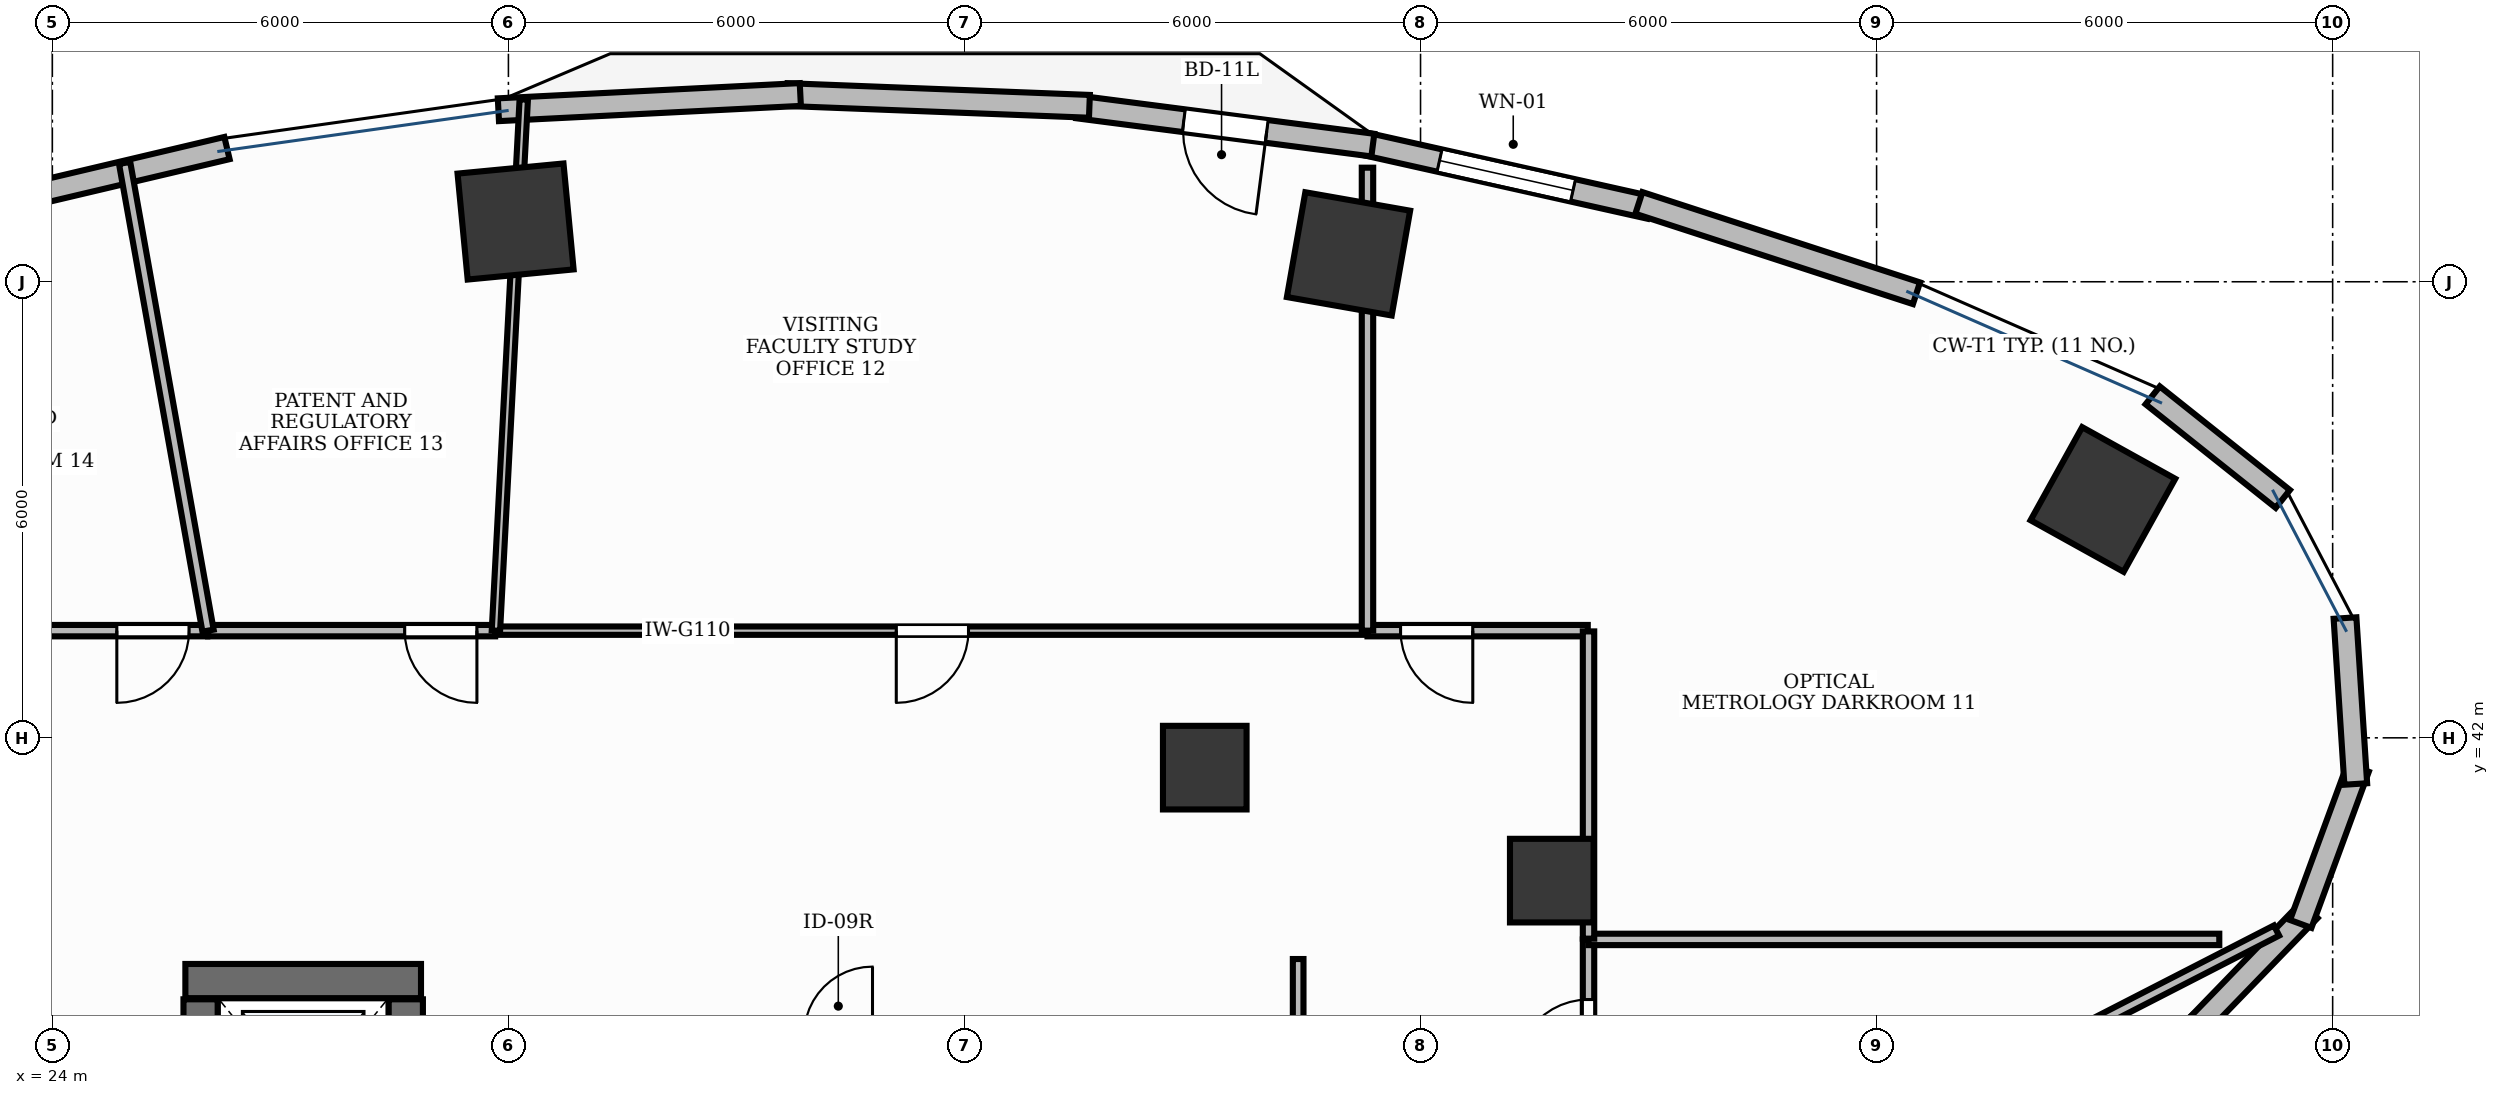
"""IFC4 building model, lengths in metres.
Left out: names, types, materials, properties, quantities, classifications, styles, units other than length and angle.
Written with IfcOpenShell. Run it as: python <this file> out.ifc"""

import sys

from ifc_helpers import new_model, si_unit, direction, frame, frame_2d, origin, origin_2d, place, context, subcontext, project, spatial, rectangle, extrude, element, fill, save


model = new_model("IFC4")
c1 = context("Model", 3, precision=1e-05, world=origin(), true_north=direction((0.0, 1.0)))
c2 = subcontext(c1, "Body", "Model", "MODEL_VIEW")
j1 = project(units=[si_unit("LENGTHUNIT", "METRE"), si_unit("PLANEANGLEUNIT", "RADIAN")], contexts=[c1])
p1 = place(None, origin())
s1 = spatial("IfcSite", under=j1, at=p1, CompositionType="ELEMENT")
p2 = place(p1, origin())
s2 = spatial("IfcBuilding", under=s1, at=p2, CompositionType="ELEMENT")
p3 = place(p2, frame((0.0, 0.0, 30.0)))
s3 = spatial("IfcBuildingStorey", under=s2, at=p3, CompositionType="ELEMENT", Elevation=30.0)
p4 = place(p3, frame((25.75, 38.8, 0.0), z_axis=(0.0, 0.0, 1.0), x_axis=(1.0, 0.0, 0.0)))
e1 = element("IfcWall", 1, at=p4, inside=s3, PredefinedType="SHEAR", context=c2, shape_type="SweptSolid", body=[
    extrude(rectangle(XDim=3.1, YDim=0.45, at=frame_2d((1.55, 0.0))), origin(), (0.0, 0.0, 1.0), 3.9),
])
for number, where, z_axis, x_axis in (
    (2, (25.95, 35.86, 0.0), (0.0, 0.0, 1.0), (0.0, 1.0, 0.0)),
    (3, (28.65, 35.86, 0.0), (0.0, 0.0, 1.0), (0.0, 1.0, 0.0)),
):
    element("IfcWall", number, at=place(p3, frame(where, z_axis=z_axis, x_axis=x_axis)), inside=s3, PredefinedType="SHEAR", context=c2, shape_type="SweptSolid", body=[
        extrude(rectangle(XDim=2.7, YDim=0.45, at=frame_2d((1.35, 0.0))), origin(), (0.0, 0.0, 1.0), 3.9),
    ])
p5 = place(p3, frame((50.977, 45.135, -0.0), z_axis=(0.0, 0.0, 1.0), x_axis=(-0.874535078577, 0.484962262797, 0.0)))
e4 = element("IfcColumn", 4, at=p5, inside=s3, PredefinedType="COLUMN", context=c2, shape_type="SweptSolid", body=[
    extrude(rectangle(XDim=1.4, YDim=1.4, at=origin_2d()), origin(), (0.0, 0.0, 1.0), 3.901),
])
p6 = place(p3, frame((43.727, 40.121, -0.0), z_axis=(0.0, 0.0, 1.0), x_axis=(1.0, 0.0, 0.0)))
e5 = element("IfcColumn", 5, at=p6, inside=s3, PredefinedType="COLUMN", context=c2, shape_type="SweptSolid", body=[
    extrude(rectangle(XDim=1.1, YDim=1.1, at=origin_2d()), origin(), (0.0, 0.0, 1.0), 3.901),
])
p7 = place(p3, frame((41.052, 48.367, -0.0), z_axis=(0.0, 0.0, 1.0), x_axis=(-0.984868307662, 0.173304404339, 0.0)))
e6 = element("IfcColumn", 6, at=p7, inside=s3, PredefinedType="COLUMN", context=c2, shape_type="SweptSolid", body=[
    extrude(rectangle(XDim=1.4, YDim=1.4, at=origin_2d()), origin(), (0.0, 0.0, 1.0), 3.901),
])
p8 = place(p3, frame((39.161, 41.608, -0.0), z_axis=(0.0, 0.0, 1.0), x_axis=(1.0, 0.0, 0.0)))
e7 = element("IfcColumn", 7, at=p8, inside=s3, PredefinedType="COLUMN", context=c2, shape_type="SweptSolid", body=[
    extrude(rectangle(XDim=1.1, YDim=1.1, at=origin_2d()), origin(), (0.0, 0.0, 1.0), 3.901),
])
p9 = place(p3, frame((30.094, 48.792, -0.0), z_axis=(0.0, 0.0, 1.0), x_axis=(0.995462868748, 0.095150811579, 0.0)))
e8 = element("IfcColumn", 8, at=p9, inside=s3, PredefinedType="COLUMN", context=c2, shape_type="SweptSolid", body=[
    extrude(rectangle(XDim=1.4, YDim=1.4, at=origin_2d()), origin(), (0.0, 0.0, 1.0), 3.901),
])
p10 = place(p3, frame((45.016, 48.976, 0.0), z_axis=(0.0, 0.0, 1.0), x_axis=(-0.9758772609, 0.218319883791, 0.0)))
e9 = element("IfcWall", 9, at=p10, inside=s3, PredefinedType="STANDARD", context=c2, shape_type="SweptSolid", body=[
    extrude(rectangle(XDim=3.869, YDim=0.3, at=frame_2d((1.935, 0.0))), origin(), (0.0, 0.0, 1.0), 3.9),
])
p11 = place(p10, frame((1.034, 0.0, 0.9)))
e10 = element("IfcOpeningElement", 10, at=p11, cuts=e9, PredefinedType="OPENING", context=c2, shape_type="SweptSolid", body=[
    extrude(rectangle(XDim=1.8, YDim=2.1, at=frame_2d((0.9, 1.05))), frame((0.0, 0.165, 0.0), z_axis=(0.0, -1.0, 0.0), x_axis=(1.0, 0.0, 0.0)), (0.0, 0.0, 1.0), 0.33),
])
p12 = place(p3, frame((41.373, 49.798, 0.0), z_axis=(0.0, 0.0, 1.0), x_axis=(-0.991741322416, 0.128254237408, 0.0)))
e11 = element("IfcWall", 11, at=p12, inside=s3, PredefinedType="STANDARD", context=c2, shape_type="SweptSolid", body=[
    extrude(rectangle(XDim=3.916, YDim=0.3, at=frame_2d((1.958, 0.0))), origin(), (0.0, 0.0, 1.0), 3.9),
])
p13 = place(p12, frame((1.408, 0.0, 0.0)))
e12 = element("IfcOpeningElement", 12, at=p13, cuts=e11, PredefinedType="OPENING", context=c2, shape_type="SweptSolid", body=[
    extrude(rectangle(XDim=1.1, YDim=2.15, at=frame_2d((0.55, 1.075))), frame((0.0, 0.165, 0.0), z_axis=(0.0, -1.0, 0.0), x_axis=(1.0, 0.0, 0.0)), (0.0, 0.0, 1.0), 0.33),
])
p14 = place(p3, frame((48.525, 47.849, 0.0), z_axis=(0.0, 0.0, 1.0), x_axis=(-0.950965833732, 0.309295947393, 0.0)))
e13 = element("IfcWall", 13, at=p14, inside=s3, PredefinedType="STANDARD", context=c2, shape_type="SweptSolid", body=[
    extrude(rectangle(XDim=3.84, YDim=0.3, at=frame_2d((1.92, 0.0))), origin(), (0.0, 0.0, 1.0), 3.9),
])
p15 = place(p3, frame((37.644, 50.308, 0.0), z_axis=(0.0, 0.0, 1.0), x_axis=(-0.999245411623, 0.038840794937, 0.0)))
e14 = element("IfcWall", 14, at=p15, inside=s3, PredefinedType="STANDARD", context=c2, shape_type="SweptSolid", body=[
    extrude(rectangle(XDim=3.979, YDim=0.3, at=frame_2d((1.989, 0.0))), origin(), (0.0, 0.0, 1.0), 3.9),
])
p16 = place(p3, frame((33.84, 50.463, 0.0), z_axis=(0.0, 0.0, 1.0), x_axis=(-0.998732359232, -0.050335619826, 0.0)))
e15 = element("IfcWall", 15, at=p16, inside=s3, PredefinedType="STANDARD", context=c2, shape_type="SweptSolid", body=[
    extrude(rectangle(XDim=3.977, YDim=0.3, at=frame_2d((1.989, 0.0))), origin(), (0.0, 0.0, 1.0), 3.9),
])
p17 = place(p3, frame((26.297, 49.759, 0.0), z_axis=(0.0, 0.0, 1.0), x_axis=(-0.973197600754, -0.229970497863, 0.0)))
e16 = element("IfcWall", 16, at=p17, inside=s3, PredefinedType="STANDARD", context=c2, shape_type="SweptSolid", body=[
    extrude(rectangle(XDim=3.901, YDim=0.3, at=frame_2d((1.951, 0.0))), origin(), (0.0, 0.0, 1.0), 3.9),
])
p18 = place(p3, frame((49.709, 36.029, 0.0), z_axis=(0.0, 0.0, 1.0), x_axis=(0.754746490246, 0.656016566454, 0.0)))
e17 = element("IfcWall", 17, at=p18, inside=s3, PredefinedType="STANDARD", context=c2, shape_type="SweptSolid", body=[
    extrude(rectangle(XDim=3.43, YDim=0.3, at=frame_2d((1.715, 0.0))), origin(), (0.0, 0.0, 1.0), 3.9),
])
p19 = place(p3, frame((52.173, 38.161, 0.0), z_axis=(0.0, 0.0, 1.0), x_axis=(0.695404695719, 0.718618333451, 0.0)))
e18 = element("IfcWall", 18, at=p19, inside=s3, PredefinedType="STANDARD", context=c2, shape_type="SweptSolid", body=[
    extrude(rectangle(XDim=2.188, YDim=0.3, at=frame_2d((1.094, 0.0))), origin(), (0.0, 0.0, 1.0), 3.9),
])
for number, where, z_axis, x_axis in (
    (19, (53.58, 39.552, 0.0), (0.0, 0.0, 1.0), (0.345, 0.939, 0.0)),
    (20, (54.304, 41.393, 0.0), (0.0, 0.0, 1.0), (-0.065, 0.998, 0.0)),
    (21, (53.344, 45.143, 0.0), (0.0, 0.0, 1.0), (-0.782, 0.623, 0.0)),
):
    element("IfcWall", number, at=place(p3, frame(where, z_axis=z_axis, x_axis=x_axis)), inside=s3, PredefinedType="STANDARD", context=c2, shape_type="SweptSolid", body=[
        extrude(rectangle(XDim=2.188, YDim=0.3, at=frame_2d((1.094, 0.0))), origin(), (0.0, 0.0, 1.0), 3.9),
    ])
p20 = place(p3, frame((44.21, 34.83, 0.0), z_axis=(0.0, 0.0, 1.0), x_axis=(0.0, 1.0, 0.0)))
e22 = element("IfcWall", 22, at=p20, inside=s3, PredefinedType="PARTITIONING", context=c2, shape_type="SweptSolid", body=[
    extrude(rectangle(XDim=4.518, YDim=0.15, at=frame_2d((2.259, 0.0))), origin(), (0.0, 0.0, 1.0), 2.91),
])
p21 = place(p20, frame((2.777, 0.0, 0.0)))
e23 = element("IfcOpeningElement", 23, at=p21, cuts=e22, PredefinedType="OPENING", context=c2, shape_type="SweptSolid", body=[
    extrude(rectangle(XDim=0.95, YDim=2.15, at=frame_2d((0.475, 1.075))), frame((0.0, 0.09, 0.0), z_axis=(0.0, -1.0, 0.0), x_axis=(1.0, 0.0, 0.0)), (0.0, 0.0, 1.0), 0.18),
])
p22 = place(p3, frame((40.39, 39.09, 0.0), z_axis=(0.0, 0.0, 1.0), x_axis=(0.0, -1.0, 0.0)))
e24 = element("IfcWall", 24, at=p22, inside=s3, PredefinedType="PARTITIONING", context=c2, shape_type="SweptSolid", body=[
    extrude(rectangle(XDim=10.48, YDim=0.14, at=frame_2d((5.24, 0.0))), origin(), (0.0, 0.0, 1.0), 2.91),
])
p23 = place(p22, frame((6.447, 0.0, 0.0)))
e25 = element("IfcOpeningElement", 25, at=p23, cuts=e24, PredefinedType="OPENING", context=c2, shape_type="SweptSolid", body=[
    extrude(rectangle(XDim=0.95, YDim=2.15, at=frame_2d((0.475, 1.075))), frame((0.0, 0.085, 0.0), z_axis=(0.0, -1.0, 0.0), x_axis=(1.0, 0.0, 0.0)), (0.0, 0.0, 1.0), 0.17),
])
p24 = place(p3, frame((44.2, 43.41, 0.0), z_axis=(0.0, 0.0, 1.0), x_axis=(-1.0, 0.0, 0.0)))
e26 = element("IfcWall", 26, at=p24, inside=s3, PredefinedType="PARTITIONING", context=c2, shape_type="SweptSolid", body=[
    extrude(rectangle(XDim=2.898, YDim=0.15, at=frame_2d((1.449, 0.0))), origin(), (0.0, 0.0, 1.0), 2.91),
])
p25 = place(p24, frame((1.513, 0.0, 0.0)))
e27 = element("IfcOpeningElement", 27, at=p25, cuts=e26, PredefinedType="OPENING", context=c2, shape_type="SweptSolid", body=[
    extrude(rectangle(XDim=0.95, YDim=2.15, at=frame_2d((0.475, 1.075))), frame((0.0, 0.09, 0.0), z_axis=(0.0, -1.0, 0.0), x_axis=(1.0, 0.0, 0.0)), (0.0, 0.0, 1.0), 0.18),
])
p26 = place(p3, frame((41.292, 43.41, 0.0), z_axis=(0.0, 0.0, 1.0), x_axis=(-1.0, 0.0, 0.0)))
e28 = element("IfcWall", 28, at=p26, inside=s3, PredefinedType="MOVABLE", context=c2, shape_type="SweptSolid", body=[
    extrude(rectangle(XDim=11.456, YDim=0.11, at=frame_2d((5.728, 0.0))), origin(), (0.0, 0.0, 1.0), 2.91),
])
p27 = place(p26, frame((5.239, 0.0, 0.0)))
e29 = element("IfcOpeningElement", 29, at=p27, cuts=e28, PredefinedType="OPENING", context=c2, shape_type="SweptSolid", body=[
    extrude(rectangle(XDim=0.95, YDim=2.15, at=frame_2d((0.475, 1.075))), frame((0.0, 0.07, 0.0), z_axis=(0.0, -1.0, 0.0), x_axis=(1.0, 0.0, 0.0)), (0.0, 0.0, 1.0), 0.14),
])
p28 = place(p3, frame((29.826, 43.41, 0.0), z_axis=(0.0, 0.0, 1.0), x_axis=(-1.0, 0.0, 0.0)))
e30 = element("IfcWall", 30, at=p28, inside=s3, PredefinedType="PARTITIONING", context=c2, shape_type="SweptSolid", body=[
    extrude(rectangle(XDim=3.777, YDim=0.15, at=frame_2d((1.889, 0.0))), origin(), (0.0, 0.0, 1.0), 2.91),
])
p29 = place(p28, frame((0.24, 0.0, 0.0)))
e31 = element("IfcOpeningElement", 31, at=p29, cuts=e30, PredefinedType="OPENING", context=c2, shape_type="SweptSolid", body=[
    extrude(rectangle(XDim=0.95, YDim=2.15, at=frame_2d((0.475, 1.075))), frame((0.0, 0.09, 0.0), z_axis=(0.0, -1.0, 0.0), x_axis=(1.0, 0.0, 0.0)), (0.0, 0.0, 1.0), 0.18),
])
p30 = place(p3, frame((26.038, 43.41, 0.0), z_axis=(0.0, 0.0, 1.0), x_axis=(-1.0, 0.0, 0.0)))
e32 = element("IfcWall", 32, at=p30, inside=s3, PredefinedType="PARTITIONING", context=c2, shape_type="SweptSolid", body=[
    extrude(rectangle(XDim=10.447, YDim=0.15, at=frame_2d((5.224, 0.0))), origin(), (0.0, 0.0, 1.0), 2.91),
])
p31 = place(p30, frame((0.24, 0.0, 0.0)))
e33 = element("IfcOpeningElement", 33, at=p31, cuts=e32, PredefinedType="OPENING", context=c2, shape_type="SweptSolid", body=[
    extrude(rectangle(XDim=0.95, YDim=2.15, at=frame_2d((0.475, 1.075))), frame((0.0, 0.09, 0.0), z_axis=(0.0, -1.0, 0.0), x_axis=(1.0, 0.0, 0.0)), (0.0, 0.0, 1.0), 0.18),
])
p32 = place(p3, frame((44.21, 34.819, 0.0), z_axis=(0.0, 0.0, 1.0), x_axis=(0.889650018361, 0.456643016842, 0.0)))
e34 = element("IfcWall", 34, at=p32, inside=s3, PredefinedType="PARTITIONING", context=c2, shape_type="SweptSolid", body=[
    extrude(rectangle(XDim=10.174, YDim=0.15, at=frame_2d((5.087, 0.0))), origin(), (0.0, 0.0, 1.0), 2.91),
])
p33 = place(p3, frame((44.21, 39.348, 0.0), z_axis=(0.0, 0.0, 1.0), x_axis=(1.0, 0.0, 0.0)))
e35 = element("IfcWall", 35, at=p33, inside=s3, PredefinedType="PARTITIONING", context=c2, shape_type="SweptSolid", body=[
    extrude(rectangle(XDim=8.299, YDim=0.15, at=frame_2d((4.149, 0.0))), origin(), (0.0, 0.0, 1.0), 2.91),
])
p34 = place(p3, frame((44.21, 39.358, 0.0), z_axis=(0.0, 0.0, 1.0), x_axis=(0.0, 1.0, 0.0)))
e36 = element("IfcWall", 36, at=p34, inside=s3, PredefinedType="PARTITIONING", context=c2, shape_type="SweptSolid", body=[
    extrude(rectangle(XDim=4.042, YDim=0.15, at=frame_2d((2.021, 0.0))), origin(), (0.0, 0.0, 1.0), 2.91),
])
p35 = place(p3, frame((41.302, 43.41, 0.0), z_axis=(0.0, 0.0, 1.0), x_axis=(0.0, 1.0, 0.0)))
e37 = element("IfcWall", 37, at=p35, inside=s3, PredefinedType="PARTITIONING", context=c2, shape_type="SweptSolid", body=[
    extrude(rectangle(XDim=6.091, YDim=0.15, at=frame_2d((3.045, 0.0))), origin(), (0.0, 0.0, 1.0), 2.91),
])
p36 = place(p3, frame((29.836, 43.41, 0.0), z_axis=(0.0, 0.0, 1.0), x_axis=(0.052328125399, 0.998629945121, 0.0)))
e38 = element("IfcWall", 38, at=p36, inside=s3, PredefinedType="MOVABLE", context=c2, shape_type="SweptSolid", body=[
    extrude(rectangle(XDim=6.998, YDim=0.11, at=frame_2d((3.499, 0.0))), origin(), (0.0, 0.0, 1.0), 2.91),
])
p37 = place(p3, frame((26.048, 43.41, 0.0), z_axis=(0.0, 0.0, 1.0), x_axis=(-0.175605435055, 0.984460629573, 0.0)))
e39 = element("IfcWall", 39, at=p37, inside=s3, PredefinedType="PARTITIONING", context=c2, shape_type="SweptSolid", body=[
    extrude(rectangle(XDim=6.251, YDim=0.15, at=frame_2d((3.125, 0.0))), origin(), (0.0, 0.0, 1.0), 2.91),
])
p38 = place(p11, origin())
e40 = element("IfcWindow", 40, at=p38, inside=s3, PartitioningType="SINGLE_PANEL", PredefinedType="WINDOW", context=c2, shape_type="SweptSolid", body=[
    extrude(rectangle(XDim=1.8, YDim=2.1, at=frame_2d((0.9, 1.05))), frame((0.0, 0.03, 0.0), z_axis=(0.0, -1.0, 0.0), x_axis=(1.0, 0.0, 0.0)), (0.0, 0.0, 1.0), 0.06),
])
fill(e10, e40)
p39 = place(p13, origin())
e41 = element("IfcDoor", 41, at=p39, inside=s3, OperationType="SINGLE_SWING_LEFT", PredefinedType="DOOR", context=c2, shape_type="SweptSolid", body=[
    extrude(rectangle(XDim=1.1, YDim=2.15, at=frame_2d((0.55, 1.075))), frame((0.0, 0.025, 0.0), z_axis=(0.0, -1.0, 0.0), x_axis=(1.0, 0.0, 0.0)), (0.0, 0.0, 1.0), 0.05),
])
fill(e12, e41)
p40 = place(p21, origin())
e42 = element("IfcDoor", 42, at=p40, inside=s3, OperationType="SINGLE_SWING_LEFT", PredefinedType="DOOR", context=c2, shape_type="SweptSolid", body=[
    extrude(rectangle(XDim=0.95, YDim=2.15, at=frame_2d((0.475, 1.075))), frame((0.0, 0.025, 0.0), z_axis=(0.0, -1.0, 0.0), x_axis=(1.0, 0.0, 0.0)), (0.0, 0.0, 1.0), 0.05),
])
fill(e23, e42)
p41 = place(p25, origin())
e43 = element("IfcDoor", 43, at=p41, inside=s3, OperationType="SINGLE_SWING_LEFT", PredefinedType="DOOR", context=c2, shape_type="SweptSolid", body=[
    extrude(rectangle(XDim=0.95, YDim=2.15, at=frame_2d((0.475, 1.075))), frame((0.0, 0.025, 0.0), z_axis=(0.0, -1.0, 0.0), x_axis=(1.0, 0.0, 0.0)), (0.0, 0.0, 1.0), 0.05),
])
fill(e27, e43)
p42 = place(p27, origin())
e44 = element("IfcDoor", 44, at=p42, inside=s3, OperationType="SINGLE_SWING_RIGHT", PredefinedType="DOOR", context=c2, shape_type="SweptSolid", body=[
    extrude(rectangle(XDim=0.95, YDim=2.15, at=frame_2d((0.475, 1.075))), frame((0.0, 0.025, 0.0), z_axis=(0.0, -1.0, 0.0), x_axis=(1.0, 0.0, 0.0)), (0.0, 0.0, 1.0), 0.05),
])
fill(e29, e44)
p43 = place(p29, origin())
e45 = element("IfcDoor", 45, at=p43, inside=s3, OperationType="SINGLE_SWING_LEFT", PredefinedType="DOOR", context=c2, shape_type="SweptSolid", body=[
    extrude(rectangle(XDim=0.95, YDim=2.15, at=frame_2d((0.475, 1.075))), frame((0.0, 0.025, 0.0), z_axis=(0.0, -1.0, 0.0), x_axis=(1.0, 0.0, 0.0)), (0.0, 0.0, 1.0), 0.05),
])
fill(e31, e45)
p44 = place(p31, origin())
e46 = element("IfcDoor", 46, at=p44, inside=s3, OperationType="SINGLE_SWING_RIGHT", PredefinedType="DOOR", context=c2, shape_type="SweptSolid", body=[
    extrude(rectangle(XDim=0.95, YDim=2.15, at=frame_2d((0.475, 1.075))), frame((0.0, 0.025, 0.0), z_axis=(0.0, -1.0, 0.0), x_axis=(1.0, 0.0, 0.0)), (0.0, 0.0, 1.0), 0.05),
])
fill(e33, e46)
save(model, sys.argv[1])
